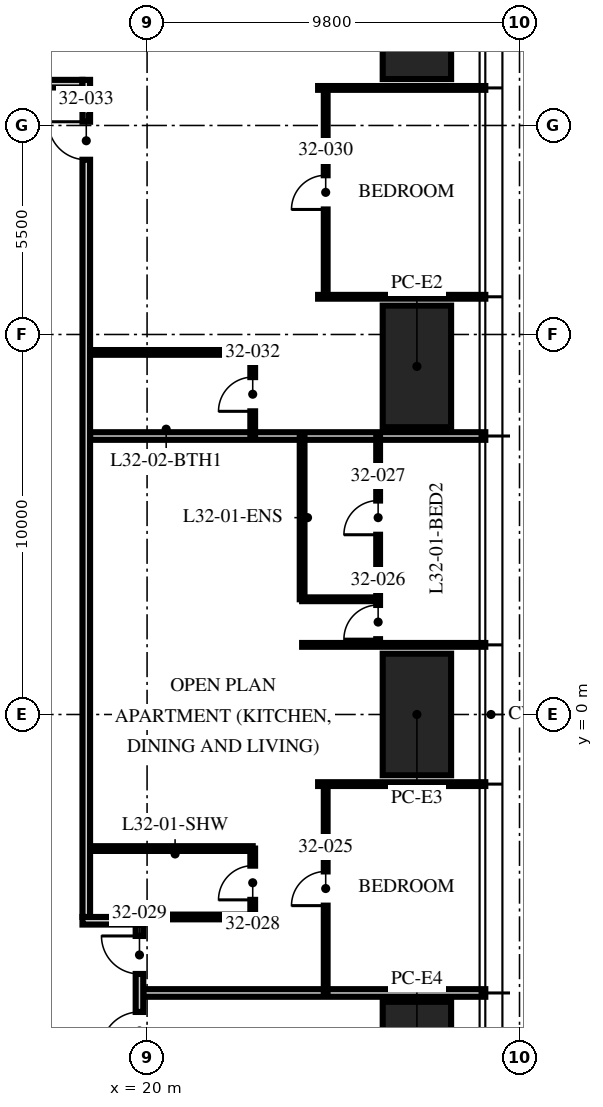
"""IFC4 building model, lengths in metres.
Left out: names, types, materials, properties, quantities, classifications, styles, units other than length and angle.
Written with IfcOpenShell. Run it as: python <this file> out.ifc"""

import sys

from ifc_helpers import new_model, si_unit, direction, frame, frame_2d, origin, origin_2d, place, context, subcontext, project, spatial, rectangle, extrude, element, fill, save


model = new_model("IFC4")
c1 = context("Model", 3, precision=1e-05, world=origin(), true_north=direction((0.0, 1.0)))
c2 = subcontext(c1, "Body", "Model", "MODEL_VIEW")
j1 = project(units=[si_unit("LENGTHUNIT", "METRE"), si_unit("PLANEANGLEUNIT", "RADIAN")], contexts=[c1])
p1 = place(None, origin())
s1 = spatial("IfcSite", under=j1, at=p1, CompositionType="ELEMENT")
p2 = place(p1, origin())
s2 = spatial("IfcBuilding", under=s1, at=p2, CompositionType="ELEMENT")
p3 = place(p2, frame((0.0, 0.0, 129.75)))
s3 = spatial("IfcBuildingStorey", under=s2, at=p3, CompositionType="ELEMENT", Elevation=129.75)
for number, where, z_axis, x_axis in (
    (1, (27.1, 18.32, 0.0), (0.0, 0.0, 1.0), (0.0, 1.0, 0.0)),
    (2, (27.1, 9.16, 0.0), (0.0, 0.0, 1.0), (0.0, 1.0, 0.0)),
    (3, (27.1, 0.0, 0.0), (0.0, 0.0, 1.0), (0.0, 1.0, 0.0)),
    (4, (27.1, -9.16, 0.0), (0.0, 0.0, 1.0), (0.0, 1.0, 0.0)),
):
    element("IfcColumn", number, at=place(p3, frame(where, z_axis=z_axis, x_axis=x_axis)), inside=s3, PredefinedType="COLUMN", context=c2, shape_type="SweptSolid", body=[
        extrude(rectangle(XDim=3.2, YDim=1.8, at=origin_2d()), origin(), (0.0, 0.0, 1.0), 3.75),
    ])
p4 = place(p3, frame((16.5, 16.6, 0.0), z_axis=(0.0, 0.0, 1.0), x_axis=(1.0, 0.0, 0.0)))
e5 = element("IfcWall", 5, at=p4, inside=s3, PredefinedType="PARTITIONING", context=c2, shape_type="SweptSolid", body=[
    extrude(rectangle(XDim=1.8, YDim=0.2, at=frame_2d((0.9, 0.0))), origin(), (0.0, 0.0, 1.0), 2.3),
])
p5 = place(p3, frame((19.9, -7.328, 0.0), z_axis=(0.0, 0.0, 1.0), x_axis=(1.0, 0.0, 0.0)))
e6 = element("IfcWall", 6, at=p5, inside=s3, PredefinedType="PARTITIONING", context=c2, shape_type="SweptSolid", body=[
    extrude(rectangle(XDim=9.0, YDim=0.2, at=frame_2d((4.5, 0.0))), origin(), (0.0, 0.0, 1.0), 2.81),
])
p6 = place(p3, frame((24.5, -1.832, 0.0), z_axis=(0.0, 0.0, 1.0), x_axis=(1.0, 0.0, 0.0)))
e7 = element("IfcWall", 7, at=p6, inside=s3, PredefinedType="PARTITIONING", context=c2, shape_type="SweptSolid", body=[
    extrude(rectangle(XDim=4.4, YDim=0.1, at=frame_2d((2.2, 0.0))), origin(), (0.0, 0.0, 1.0), 2.81),
])
p7 = place(p3, frame((24.08, 1.832, 0.0), z_axis=(0.0, 0.0, 1.0), x_axis=(1.0, 0.0, 0.0)))
e8 = element("IfcWall", 8, at=p7, inside=s3, PredefinedType="PARTITIONING", context=c2, shape_type="SweptSolid", body=[
    extrude(rectangle(XDim=4.82, YDim=0.1, at=frame_2d((2.41, 0.0))), origin(), (0.0, 0.0, 1.0), 2.81),
])
p8 = place(p3, frame((18.5, 7.328, 0.0), z_axis=(0.0, 0.0, 1.0), x_axis=(1.0, 0.0, 0.0)))
e9 = element("IfcWall", 9, at=p8, inside=s3, PredefinedType="PARTITIONING", context=c2, shape_type="SweptSolid", body=[
    extrude(rectangle(XDim=10.4, YDim=0.2, at=frame_2d((5.2, 0.0))), origin(), (0.0, 0.0, 1.0), 2.81),
])
for number, where, z_axis, x_axis in (
    (10, (24.5, 10.992, 0.0), (0.0, 0.0, 1.0), (1.0, 0.0, 0.0)),
    (11, (24.5, 16.488, 0.0), (0.0, 0.0, 1.0), (1.0, 0.0, 0.0)),
):
    element("IfcWall", number, at=place(p3, frame(where, z_axis=z_axis, x_axis=x_axis)), inside=s3, PredefinedType="PARTITIONING", context=c2, shape_type="SweptSolid", body=[
        extrude(rectangle(XDim=4.4, YDim=0.1, at=frame_2d((2.2, 0.0))), origin(), (0.0, 0.0, 1.0), 2.81),
    ])
p9 = place(p3, frame((24.7, -7.328, 0.0), z_axis=(0.0, 0.0, 1.0), x_axis=(0.0, 1.0, 0.0)))
e12 = element("IfcWall", 12, at=p9, inside=s3, PredefinedType="PARTITIONING", context=c2, shape_type="SweptSolid", body=[
    extrude(rectangle(XDim=5.496, YDim=0.1, at=frame_2d((2.748, 0.0))), origin(), (0.0, 0.0, 1.0), 2.81),
])
p10 = place(p9, frame((2.298, 0.0, 0.0)))
e13 = element("IfcOpeningElement", 13, at=p10, cuts=e12, PredefinedType="OPENING", context=c2, shape_type="SweptSolid", body=[
    extrude(rectangle(XDim=0.9, YDim=2.1, at=frame_2d((0.45, 1.05))), frame((0.0, 0.06, 0.0), z_axis=(0.0, -1.0, 0.0), x_axis=(1.0, 0.0, 0.0)), (0.0, 0.0, 1.0), 0.12),
])
p11 = place(p3, frame((26.08, 1.832, 0.0), z_axis=(0.0, 0.0, 1.0), x_axis=(0.0, 1.0, 0.0)))
e14 = element("IfcWall", 14, at=p11, inside=s3, PredefinedType="PARTITIONING", context=c2, shape_type="SweptSolid", body=[
    extrude(rectangle(XDim=5.496, YDim=0.1, at=frame_2d((2.748, 0.0))), origin(), (0.0, 0.0, 1.0), 2.81),
])
p12 = place(p11, frame((0.15, 0.0, 0.0)))
e15 = element("IfcOpeningElement", 15, at=p12, cuts=e14, PredefinedType="OPENING", context=c2, shape_type="SweptSolid", body=[
    extrude(rectangle(XDim=0.9, YDim=2.1, at=frame_2d((0.45, 1.05))), frame((0.0, 0.06, 0.0), z_axis=(0.0, -1.0, 0.0), x_axis=(1.0, 0.0, 0.0)), (0.0, 0.0, 1.0), 0.12),
])
p13 = place(p11, frame((2.898, 0.0, 0.0)))
e16 = element("IfcOpeningElement", 16, at=p13, cuts=e14, PredefinedType="OPENING", context=c2, shape_type="SweptSolid", body=[
    extrude(rectangle(XDim=0.9, YDim=2.1, at=frame_2d((0.45, 1.05))), frame((0.0, 0.06, 0.0), z_axis=(0.0, -1.0, 0.0), x_axis=(1.0, 0.0, 0.0)), (0.0, 0.0, 1.0), 0.12),
])
p14 = place(p3, frame((24.08, 3.032, 0.0), z_axis=(0.0, 0.0, 1.0), x_axis=(1.0, 0.0, 0.0)))
e17 = element("IfcWall", 17, at=p14, inside=s3, PredefinedType="PARTITIONING", context=c2, shape_type="SweptSolid", body=[
    extrude(rectangle(XDim=2.0, YDim=0.1, at=frame_2d((1.0, 0.0))), origin(), (0.0, 0.0, 1.0), 3.5),
])
p15 = place(p3, frame((24.08, 3.032, 0.0), z_axis=(0.0, 0.0, 1.0), x_axis=(0.0, 1.0, 0.0)))
e18 = element("IfcWall", 18, at=p15, inside=s3, PredefinedType="PARTITIONING", context=c2, shape_type="SweptSolid", body=[
    extrude(rectangle(XDim=4.296, YDim=0.125, at=frame_2d((2.148, 0.0))), origin(), (0.0, 0.0, 1.0), 2.81),
])
p16 = place(p3, frame((22.78, -5.328, 0.0), z_axis=(0.0, 0.0, 1.0), x_axis=(0.0, 1.0, 0.0)))
e19 = element("IfcWall", 19, at=p16, inside=s3, PredefinedType="PARTITIONING", context=c2, shape_type="SweptSolid", body=[
    extrude(rectangle(XDim=1.8, YDim=0.125, at=frame_2d((0.9, 0.0))), origin(), (0.0, 0.0, 1.0), 2.81),
])
p17 = place(p16, frame((0.45, 0.0, 0.0)))
e20 = element("IfcOpeningElement", 20, at=p17, cuts=e19, PredefinedType="OPENING", context=c2, shape_type="SweptSolid", body=[
    extrude(rectangle(XDim=0.9, YDim=2.1, at=frame_2d((0.45, 1.05))), frame((0.0, 0.073, 0.0), z_axis=(0.0, -1.0, 0.0), x_axis=(1.0, 0.0, 0.0)), (0.0, 0.0, 1.0), 0.145),
])
p18 = place(p3, frame((19.97, -5.328, 0.0), z_axis=(0.0, 0.0, 1.0), x_axis=(1.0, 0.0, 0.0)))
e21 = element("IfcWall", 21, at=p18, inside=s3, PredefinedType="PARTITIONING", context=c2, shape_type="SweptSolid", body=[
    extrude(rectangle(XDim=2.81, YDim=0.125, at=frame_2d((1.405, 0.0))), origin(), (0.0, 0.0, 1.0), 3.5),
])
p19 = place(p3, frame((18.5, -3.528, 0.0), z_axis=(0.0, 0.0, 1.0), x_axis=(1.0, 0.0, 0.0)))
e22 = element("IfcWall", 22, at=p19, inside=s3, PredefinedType="PARTITIONING", context=c2, shape_type="SweptSolid", body=[
    extrude(rectangle(XDim=4.28, YDim=0.125, at=frame_2d((2.14, 0.0))), origin(), (0.0, 0.0, 1.0), 3.5),
])
p20 = place(p3, frame((24.7, 10.992, 0.0), z_axis=(0.0, 0.0, 1.0), x_axis=(0.0, 1.0, 0.0)))
e23 = element("IfcWall", 23, at=p20, inside=s3, PredefinedType="PARTITIONING", context=c2, shape_type="SweptSolid", body=[
    extrude(rectangle(XDim=5.496, YDim=0.1, at=frame_2d((2.748, 0.0))), origin(), (0.0, 0.0, 1.0), 2.81),
])
p21 = place(p20, frame((2.298, 0.0, 0.0)))
e24 = element("IfcOpeningElement", 24, at=p21, cuts=e23, PredefinedType="OPENING", context=c2, shape_type="SweptSolid", body=[
    extrude(rectangle(XDim=0.9, YDim=2.1, at=frame_2d((0.45, 1.05))), frame((0.0, 0.06, 0.0), z_axis=(0.0, -1.0, 0.0), x_axis=(1.0, 0.0, 0.0)), (0.0, 0.0, 1.0), 0.12),
])
p22 = place(p3, frame((22.78, 7.328, 0.0), z_axis=(0.0, 0.0, 1.0), x_axis=(0.0, 1.0, 0.0)))
e25 = element("IfcWall", 25, at=p22, inside=s3, PredefinedType="PARTITIONING", context=c2, shape_type="SweptSolid", body=[
    extrude(rectangle(XDim=2.2, YDim=0.125, at=frame_2d((1.1, 0.0))), origin(), (0.0, 0.0, 1.0), 2.7),
])
p23 = place(p22, frame((0.65, 0.0, 0.0)))
e26 = element("IfcOpeningElement", 26, at=p23, cuts=e25, PredefinedType="OPENING", context=c2, shape_type="SweptSolid", body=[
    extrude(rectangle(XDim=0.9, YDim=2.1, at=frame_2d((0.45, 1.05))), frame((0.0, 0.073, 0.0), z_axis=(0.0, -1.0, 0.0), x_axis=(1.0, 0.0, 0.0)), (0.0, 0.0, 1.0), 0.145),
])
p24 = place(p3, frame((18.5, 9.528, 0.0), z_axis=(0.0, 0.0, 1.0), x_axis=(1.0, 0.0, 0.0)))
e27 = element("IfcWall", 27, at=p24, inside=s3, PredefinedType="PARTITIONING", context=c2, shape_type="SweptSolid", body=[
    extrude(rectangle(XDim=4.28, YDim=0.125, at=frame_2d((2.14, 0.0))), origin(), (0.0, 0.0, 1.0), 3.5),
])
p25 = place(p3, frame((18.3, -5.428, 0.0), z_axis=(0.0, 0.0, 1.0), x_axis=(1.0, 0.0, 0.0)))
e28 = element("IfcWall", 28, at=p25, inside=s3, PredefinedType="PARTITIONING", context=c2, shape_type="SweptSolid", body=[
    extrude(rectangle(XDim=1.6, YDim=0.2, at=frame_2d((0.8, 0.0))), origin(), (0.0, 0.0, 1.0), 3.5),
])
p26 = place(p3, frame((19.8, -9.128, 0.0), z_axis=(0.0, 0.0, 1.0), x_axis=(0.0, 1.0, 0.0)))
e29 = element("IfcWall", 29, at=p26, inside=s3, PredefinedType="PARTITIONING", context=c2, shape_type="SweptSolid", body=[
    extrude(rectangle(XDim=3.6, YDim=0.2, at=frame_2d((1.8, 0.0))), origin(), (0.0, 0.0, 1.0), 2.7),
])
p27 = place(p26, frame((2.3, 0.0, 0.0)))
e30 = element("IfcOpeningElement", 30, at=p27, cuts=e29, PredefinedType="OPENING", context=c2, shape_type="SweptSolid", body=[
    extrude(rectangle(XDim=1.0, YDim=2.2, at=frame_2d((0.5, 1.1))), frame((0.0, 0.11, 0.0), z_axis=(0.0, -1.0, 0.0), x_axis=(1.0, 0.0, 0.0)), (0.0, 0.0, 1.0), 0.22),
])
p28 = place(p26, frame((0.3, 0.0, 0.0)))
e31 = element("IfcOpeningElement", 31, at=p28, cuts=e29, PredefinedType="OPENING", context=c2, shape_type="SweptSolid", body=[
    extrude(rectangle(XDim=1.0, YDim=2.2, at=frame_2d((0.5, 1.1))), frame((0.0, 0.11, 0.0), z_axis=(0.0, -1.0, 0.0), x_axis=(1.0, 0.0, 0.0)), (0.0, 0.0, 1.0), 0.22),
])
p29 = place(p3, frame((18.4, -5.328, 0.0), z_axis=(0.0, 0.0, 1.0), x_axis=(0.0, 1.0, 0.0)))
e32 = element("IfcWall", 32, at=p29, inside=s3, PredefinedType="PARTITIONING", context=c2, shape_type="SweptSolid", body=[
    extrude(rectangle(XDim=22.028, YDim=0.2, at=frame_2d((11.014, 0.0))), origin(), (0.0, 0.0, 1.0), 2.7),
])
p30 = place(p29, frame((19.926, 0.0, 0.0)))
e33 = element("IfcOpeningElement", 33, at=p30, cuts=e32, PredefinedType="OPENING", context=c2, shape_type="SweptSolid", body=[
    extrude(rectangle(XDim=1.0, YDim=2.2, at=frame_2d((0.5, 1.1))), frame((0.0, 0.11, 0.0), z_axis=(0.0, -1.0, 0.0), x_axis=(1.0, 0.0, 0.0)), (0.0, 0.0, 1.0), 0.22),
])
p31 = place(p10, origin())
e34 = element("IfcDoor", 34, at=p31, inside=s3, OperationType="SINGLE_SWING_LEFT", PredefinedType="DOOR", context=c2, shape_type="SweptSolid", body=[
    extrude(rectangle(XDim=0.9, YDim=2.1, at=frame_2d((0.45, 1.05))), frame((0.0, 0.025, 0.0), z_axis=(0.0, -1.0, 0.0), x_axis=(1.0, 0.0, 0.0)), (0.0, 0.0, 1.0), 0.05),
])
fill(e13, e34)
p32 = place(p12, origin())
e35 = element("IfcDoor", 35, at=p32, inside=s3, OperationType="SINGLE_SWING_LEFT", PredefinedType="DOOR", context=c2, shape_type="SweptSolid", body=[
    extrude(rectangle(XDim=0.9, YDim=2.1, at=frame_2d((0.45, 1.05))), frame((0.0, 0.025, 0.0), z_axis=(0.0, -1.0, 0.0), x_axis=(1.0, 0.0, 0.0)), (0.0, 0.0, 1.0), 0.05),
])
fill(e15, e35)
p33 = place(p13, origin())
e36 = element("IfcDoor", 36, at=p33, inside=s3, OperationType="SINGLE_SWING_LEFT", PredefinedType="DOOR", context=c2, shape_type="SweptSolid", body=[
    extrude(rectangle(XDim=0.9, YDim=2.1, at=frame_2d((0.45, 1.05))), frame((0.0, 0.025, 0.0), z_axis=(0.0, -1.0, 0.0), x_axis=(1.0, 0.0, 0.0)), (0.0, 0.0, 1.0), 0.05),
])
fill(e16, e36)
p34 = place(p17, origin())
e37 = element("IfcDoor", 37, at=p34, inside=s3, OperationType="SINGLE_SWING_LEFT", PredefinedType="DOOR", context=c2, shape_type="SweptSolid", body=[
    extrude(rectangle(XDim=0.9, YDim=2.1, at=frame_2d((0.45, 1.05))), frame((0.0, 0.025, 0.0), z_axis=(0.0, -1.0, 0.0), x_axis=(1.0, 0.0, 0.0)), (0.0, 0.0, 1.0), 0.05),
])
fill(e20, e37)
p35 = place(p27, origin())
e38 = element("IfcDoor", 38, at=p35, inside=s3, OperationType="SINGLE_SWING_RIGHT", PredefinedType="DOOR", context=c2, shape_type="SweptSolid", body=[
    extrude(rectangle(XDim=1.0, YDim=2.2, at=frame_2d((0.5, 1.1))), frame((0.0, 0.025, 0.0), z_axis=(0.0, -1.0, 0.0), x_axis=(1.0, 0.0, 0.0)), (0.0, 0.0, 1.0), 0.05),
])
fill(e30, e38)
p36 = place(p21, origin())
e39 = element("IfcDoor", 39, at=p36, inside=s3, OperationType="SINGLE_SWING_LEFT", PredefinedType="DOOR", context=c2, shape_type="SweptSolid", body=[
    extrude(rectangle(XDim=0.9, YDim=2.1, at=frame_2d((0.45, 1.05))), frame((0.0, 0.025, 0.0), z_axis=(0.0, -1.0, 0.0), x_axis=(1.0, 0.0, 0.0)), (0.0, 0.0, 1.0), 0.05),
])
fill(e24, e39)
p37 = place(p23, origin())
e40 = element("IfcDoor", 40, at=p37, inside=s3, OperationType="SINGLE_SWING_LEFT", PredefinedType="DOOR", context=c2, shape_type="SweptSolid", body=[
    extrude(rectangle(XDim=0.9, YDim=2.1, at=frame_2d((0.45, 1.05))), frame((0.0, 0.025, 0.0), z_axis=(0.0, -1.0, 0.0), x_axis=(1.0, 0.0, 0.0)), (0.0, 0.0, 1.0), 0.05),
])
fill(e26, e40)
p38 = place(p30, origin())
e41 = element("IfcDoor", 41, at=p38, inside=s3, OperationType="SINGLE_SWING_RIGHT", PredefinedType="DOOR", context=c2, shape_type="SweptSolid", body=[
    extrude(rectangle(XDim=1.0, YDim=2.2, at=frame_2d((0.5, 1.1))), frame((0.0, 0.025, 0.0), z_axis=(0.0, -1.0, 0.0), x_axis=(1.0, 0.0, 0.0)), (0.0, 0.0, 1.0), 0.05),
])
fill(e33, e41)
p39 = place(p28, origin())
e42 = element("IfcDoor", 42, at=p39, inside=s3, OperationType="SINGLE_SWING_LEFT", PredefinedType="DOOR", context=c2, shape_type="SweptSolid", body=[
    extrude(rectangle(XDim=1.0, YDim=2.2, at=frame_2d((0.5, 1.1))), frame((0.0, 0.025, 0.0), z_axis=(0.0, -1.0, 0.0), x_axis=(1.0, 0.0, 0.0)), (0.0, 0.0, 1.0), 0.05),
])
fill(e31, e42)
save(model, sys.argv[1])
